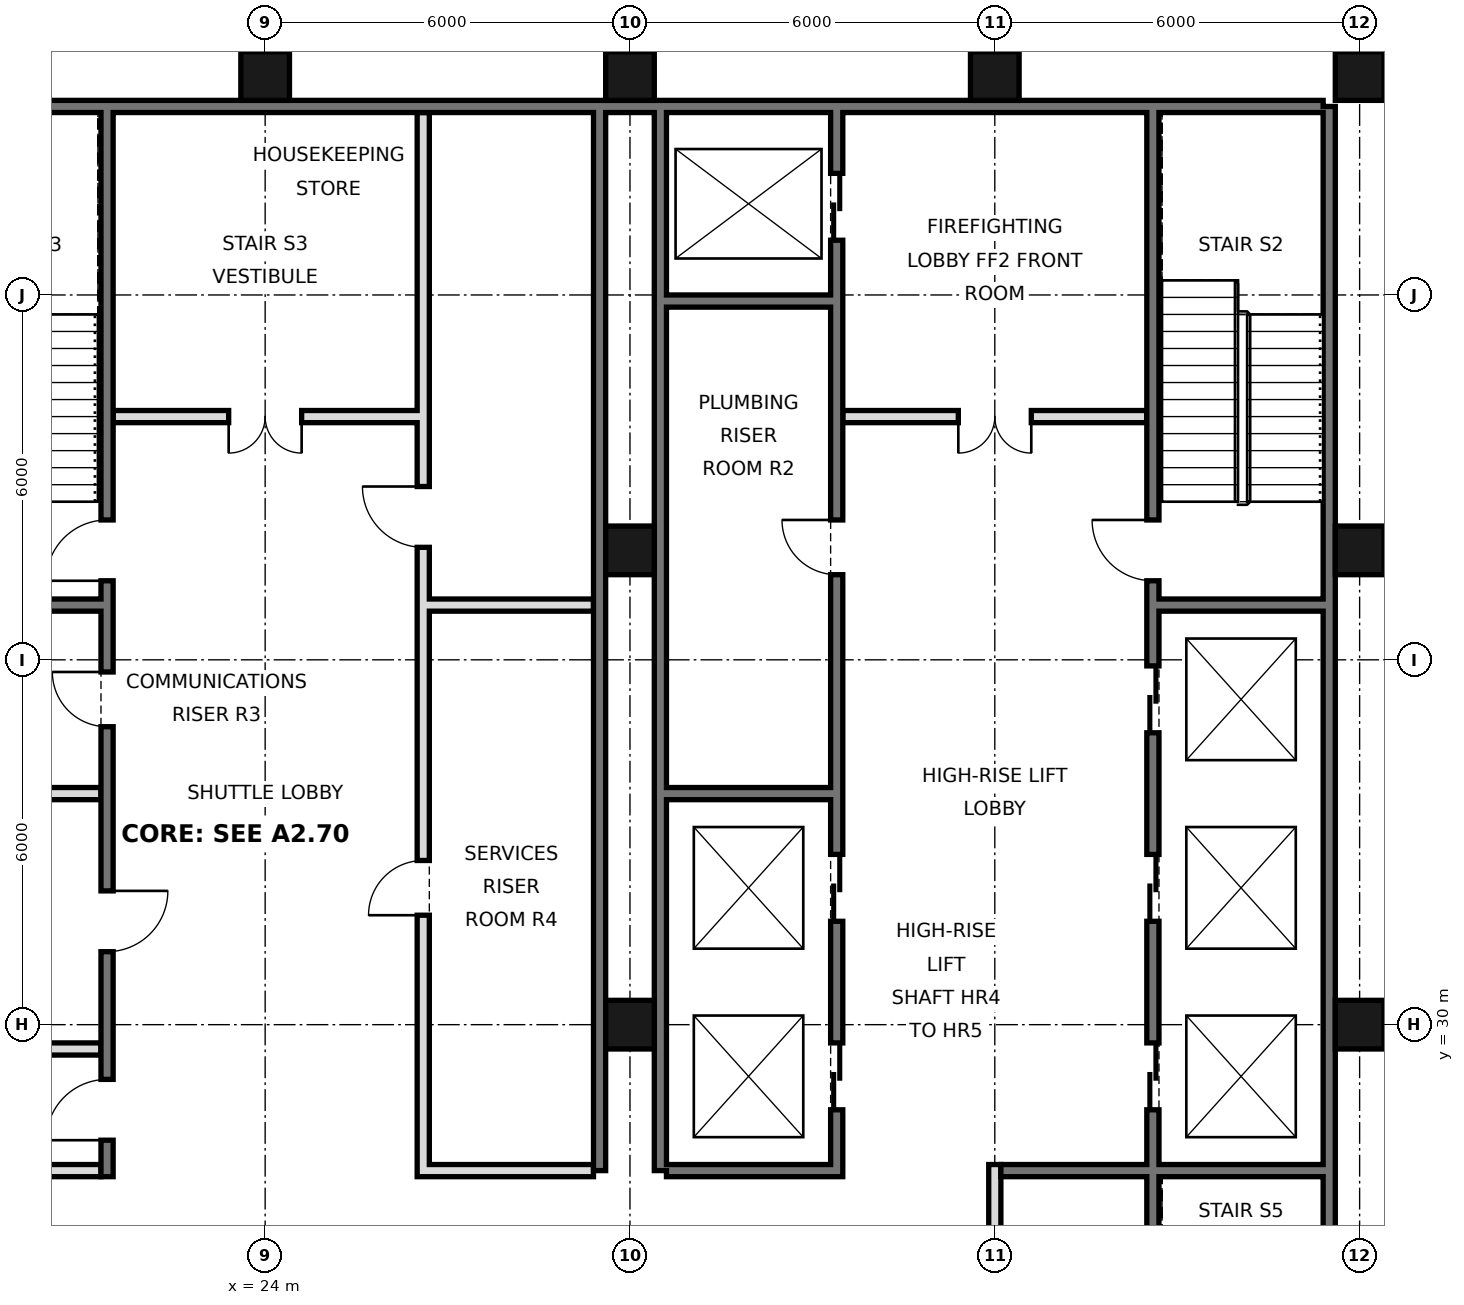
"""IFC4 building model, lengths in metres.
Left out: names, types, materials, properties, quantities, classifications, styles, units other than length and angle.
Written with IfcOpenShell. Run it as: python <this file> out.ifc"""

import sys

from ifc_helpers import new_model, si_unit, direction, frame, frame_2d, origin, origin_2d, place, context, subcontext, project, spatial, rectangle, hollow_rectangle, extrude, element, fill, save


model = new_model("IFC4")
c1 = context("Model", 3, precision=1e-05, world=origin(), true_north=direction((0.0, 1.0)))
c2 = subcontext(c1, "Body", "Model", "MODEL_VIEW")
j1 = project(units=[si_unit("LENGTHUNIT", "METRE"), si_unit("PLANEANGLEUNIT", "RADIAN")], contexts=[c1])
p1 = place(None, origin())
s1 = spatial("IfcSite", under=j1, at=p1, CompositionType="ELEMENT")
p2 = place(p1, origin())
s2 = spatial("IfcBuilding", under=s1, at=p2, CompositionType="ELEMENT")
p3 = place(p2, frame((0.0, 0.0, 277.4)))
s3 = spatial("IfcBuildingStorey", under=s2, at=p3, CompositionType="ELEMENT", Elevation=277.4)
for number, where, z_axis, x_axis in (
    (1, (24.0, 45.6, 0.0), (0.0, 0.0, 1.0), (1.0, 0.0, 0.0)),
    (2, (30.0, 30.0, 0.0), (0.0, 0.0, 1.0), (1.0, 0.0, 0.0)),
    (3, (30.0, 37.8, 0.0), (0.0, 0.0, 1.0), (1.0, 0.0, 0.0)),
    (4, (30.0, 45.6, 0.0), (0.0, 0.0, 1.0), (1.0, 0.0, 0.0)),
    (5, (36.0, 45.6, 0.0), (0.0, 0.0, 1.0), (1.0, 0.0, 0.0)),
    (6, (42.0, 30.0, 0.0), (0.0, 0.0, 1.0), (1.0, 0.0, 0.0)),
    (7, (42.0, 37.8, 0.0), (0.0, 0.0, 1.0), (1.0, 0.0, 0.0)),
    (8, (42.0, 45.6, 0.0), (0.0, 0.0, 1.0), (1.0, 0.0, 0.0)),
):
    element("IfcColumn", number, at=place(p3, frame(where, z_axis=z_axis, x_axis=x_axis)), inside=s3, PredefinedType="COLUMN", context=c2, shape_type="SweptSolid", body=[
        extrude(hollow_rectangle(XDim=0.8, YDim=0.8, WallThickness=0.032, at=origin_2d()), origin(), (0.0, 0.0, 1.0), 4.4),
    ])
p4 = place(p3, frame((41.5, 21.6, 0.0), z_axis=(0.0, 0.0, 1.0), x_axis=(0.0, 1.0, 0.0)))
e9 = element("IfcWall", 9, at=p4, inside=s3, PredefinedType="SOLIDWALL", context=c2, shape_type="SweptSolid", body=[
    extrude(rectangle(XDim=23.5, YDim=0.2, at=frame_2d((11.75, 0.0))), origin(), (0.0, 0.0, 1.0), 4.1),
])
p5 = place(p3, frame((6.6, 45.1, 0.0), z_axis=(0.0, 0.0, 1.0), x_axis=(1.0, 0.0, 0.0)))
e10 = element("IfcWall", 10, at=p5, inside=s3, PredefinedType="SOLIDWALL", context=c2, shape_type="SweptSolid", body=[
    extrude(rectangle(XDim=34.8, YDim=0.2, at=frame_2d((17.4, 0.0))), origin(), (0.0, 0.0, 1.0), 4.1),
])
for number, where, z_axis, x_axis in (
    (11, (29.5, 27.6, 0.0), (0.0, 0.0, 1.0), (0.0, 1.0, 0.0)),
    (12, (30.5, 27.6, 0.0), (0.0, 0.0, 1.0), (0.0, 1.0, 0.0)),
):
    element("IfcWall", number, at=place(p3, frame(where, z_axis=z_axis, x_axis=x_axis)), inside=s3, PredefinedType="SOLIDWALL", context=c2, shape_type="SweptSolid", body=[
        extrude(rectangle(XDim=17.5, YDim=0.2, at=frame_2d((8.75, 0.0))), origin(), (0.0, 0.0, 1.0), 4.1),
    ])
p6 = place(p3, frame((21.4, 27.5, 0.0), z_axis=(0.0, 0.0, 1.0), x_axis=(0.0, 1.0, 0.0)))
e13 = element("IfcWall", 13, at=p6, inside=s3, PredefinedType="SOLIDWALL", context=c2, shape_type="SweptSolid", body=[
    extrude(rectangle(XDim=17.5, YDim=0.2, at=frame_2d((8.75, 0.0))), origin(), (0.0, 0.0, 1.0), 4.1),
])
p7 = place(p6, frame((0.6, 0.0, 0.0)))
e14 = element("IfcOpeningElement", 14, at=p7, cuts=e13, PredefinedType="OPENING", context=c2, shape_type="SweptSolid", body=[
    extrude(rectangle(XDim=1.0, YDim=2.1, at=frame_2d((0.5, 1.05))), frame((0.0, 0.11, 0.0), z_axis=(0.0, -1.0, 0.0), x_axis=(1.0, 0.0, 0.0)), (0.0, 0.0, 1.0), 0.22),
])
p8 = place(p6, frame((3.7, 0.0, 0.0)))
e15 = element("IfcOpeningElement", 15, at=p8, cuts=e13, PredefinedType="OPENING", context=c2, shape_type="SweptSolid", body=[
    extrude(rectangle(XDim=1.0, YDim=2.1, at=frame_2d((0.5, 1.05))), frame((0.0, 0.11, 0.0), z_axis=(0.0, -1.0, 0.0), x_axis=(1.0, 0.0, 0.0)), (0.0, 0.0, 1.0), 0.22),
])
p9 = place(p6, frame((9.8, 0.0, 0.0)))
e16 = element("IfcOpeningElement", 16, at=p9, cuts=e13, PredefinedType="OPENING", context=c2, shape_type="SweptSolid", body=[
    extrude(rectangle(XDim=1.0, YDim=2.1, at=frame_2d((0.5, 1.05))), frame((0.0, 0.11, 0.0), z_axis=(0.0, -1.0, 0.0), x_axis=(1.0, 0.0, 0.0)), (0.0, 0.0, 1.0), 0.22),
])
p10 = place(p6, frame((7.4, 0.0, 0.0)))
e17 = element("IfcOpeningElement", 17, at=p10, cuts=e13, PredefinedType="OPENING", context=c2, shape_type="SweptSolid", body=[
    extrude(rectangle(XDim=0.9, YDim=2.1, at=frame_2d((0.45, 1.05))), frame((0.0, 0.11, 0.0), z_axis=(0.0, -1.0, 0.0), x_axis=(1.0, 0.0, 0.0)), (0.0, 0.0, 1.0), 0.22),
])
p11 = place(p3, frame((26.6, 27.5, 0.0), z_axis=(0.0, 0.0, 1.0), x_axis=(0.0, 1.0, 0.0)))
e18 = element("IfcWall", 18, at=p11, inside=s3, PredefinedType="SOLIDWALL", context=c2, shape_type="SweptSolid", body=[
    extrude(rectangle(XDim=17.5, YDim=0.2, at=frame_2d((8.75, 0.0))), origin(), (0.0, 0.0, 1.0), 4.1),
])
p12 = place(p11, frame((4.3, 0.0, 0.0)))
e19 = element("IfcOpeningElement", 19, at=p12, cuts=e18, PredefinedType="OPENING", context=c2, shape_type="SweptSolid", body=[
    extrude(rectangle(XDim=0.9, YDim=2.1, at=frame_2d((0.45, 1.05))), frame((0.0, 0.11, 0.0), z_axis=(0.0, -1.0, 0.0), x_axis=(1.0, 0.0, 0.0)), (0.0, 0.0, 1.0), 0.22),
])
p13 = place(p11, frame((10.35, 0.0, 0.0)))
e20 = element("IfcOpeningElement", 20, at=p13, cuts=e18, PredefinedType="OPENING", context=c2, shape_type="SweptSolid", body=[
    extrude(rectangle(XDim=1.0, YDim=2.1, at=frame_2d((0.5, 1.05))), frame((0.0, 0.11, 0.0), z_axis=(0.0, -1.0, 0.0), x_axis=(1.0, 0.0, 0.0)), (0.0, 0.0, 1.0), 0.22),
])
p14 = place(p3, frame((33.4, 27.5, 0.0), z_axis=(0.0, 0.0, 1.0), x_axis=(0.0, 1.0, 0.0)))
e21 = element("IfcWall", 21, at=p14, inside=s3, PredefinedType="SOLIDWALL", context=c2, shape_type="SweptSolid", body=[
    extrude(rectangle(XDim=17.5, YDim=0.2, at=frame_2d((8.75, 0.0))), origin(), (0.0, 0.0, 1.0), 4.1),
])
p15 = place(p14, frame((1.1, 0.0, 0.0)))
e22 = element("IfcOpeningElement", 22, at=p15, cuts=e21, PredefinedType="OPENING", context=c2, shape_type="SweptSolid", body=[
    extrude(rectangle(XDim=1.1, YDim=2.1, at=frame_2d((0.55, 1.05))), frame((0.0, 0.11, 0.0), z_axis=(0.0, -1.0, 0.0), x_axis=(1.0, 0.0, 0.0)), (0.0, 0.0, 1.0), 0.22),
])
p16 = place(p14, frame((4.2, 0.0, 0.0)))
e23 = element("IfcOpeningElement", 23, at=p16, cuts=e21, PredefinedType="OPENING", context=c2, shape_type="SweptSolid", body=[
    extrude(rectangle(XDim=1.1, YDim=2.1, at=frame_2d((0.55, 1.05))), frame((0.0, 0.11, 0.0), z_axis=(0.0, -1.0, 0.0), x_axis=(1.0, 0.0, 0.0)), (0.0, 0.0, 1.0), 0.22),
])
p17 = place(p14, frame((15.4, 0.0, 0.0)))
e24 = element("IfcOpeningElement", 24, at=p17, cuts=e21, PredefinedType="OPENING", context=c2, shape_type="SweptSolid", body=[
    extrude(rectangle(XDim=1.1, YDim=2.1, at=frame_2d((0.55, 1.05))), frame((0.0, 0.11, 0.0), z_axis=(0.0, -1.0, 0.0), x_axis=(1.0, 0.0, 0.0)), (0.0, 0.0, 1.0), 0.22),
])
p18 = place(p14, frame((9.9, 0.0, 0.0)))
e25 = element("IfcOpeningElement", 25, at=p18, cuts=e21, PredefinedType="OPENING", context=c2, shape_type="SweptSolid", body=[
    extrude(rectangle(XDim=0.9, YDim=2.1, at=frame_2d((0.45, 1.05))), frame((0.0, 0.11, 0.0), z_axis=(0.0, -1.0, 0.0), x_axis=(1.0, 0.0, 0.0)), (0.0, 0.0, 1.0), 0.22),
])
p19 = place(p3, frame((36.0, 21.6, 0.0), z_axis=(0.0, 0.0, 1.0), x_axis=(0.0, 1.0, 0.0)))
e26 = element("IfcWall", 26, at=p19, inside=s3, PredefinedType="PARTITIONING", context=c2, shape_type="SweptSolid", body=[
    extrude(rectangle(XDim=6.1, YDim=0.2, at=frame_2d((3.05, 0.0))), origin(), (0.0, 0.0, 1.0), 4.1),
])
p20 = place(p3, frame((38.6, 21.6, 0.0), z_axis=(0.0, 0.0, 1.0), x_axis=(0.0, 1.0, 0.0)))
e27 = element("IfcWall", 27, at=p20, inside=s3, PredefinedType="SOLIDWALL", context=c2, shape_type="SweptSolid", body=[
    extrude(rectangle(XDim=23.4, YDim=0.2, at=frame_2d((11.7, 0.0))), origin(), (0.0, 0.0, 1.0), 4.1),
])
p21 = place(p20, frame((7.0, 0.0, 0.0)))
e28 = element("IfcOpeningElement", 28, at=p21, cuts=e27, PredefinedType="OPENING", context=c2, shape_type="SweptSolid", body=[
    extrude(rectangle(XDim=1.1, YDim=2.1, at=frame_2d((0.55, 1.05))), frame((0.0, 0.11, 0.0), z_axis=(0.0, -1.0, 0.0), x_axis=(1.0, 0.0, 0.0)), (0.0, 0.0, 1.0), 0.22),
])
p22 = place(p20, frame((10.1, 0.0, 0.0)))
e29 = element("IfcOpeningElement", 29, at=p22, cuts=e27, PredefinedType="OPENING", context=c2, shape_type="SweptSolid", body=[
    extrude(rectangle(XDim=1.1, YDim=2.1, at=frame_2d((0.55, 1.05))), frame((0.0, 0.11, 0.0), z_axis=(0.0, -1.0, 0.0), x_axis=(1.0, 0.0, 0.0)), (0.0, 0.0, 1.0), 0.22),
])
p23 = place(p20, frame((13.2, 0.0, 0.0)))
e30 = element("IfcOpeningElement", 30, at=p23, cuts=e27, PredefinedType="OPENING", context=c2, shape_type="SweptSolid", body=[
    extrude(rectangle(XDim=1.1, YDim=2.1, at=frame_2d((0.55, 1.05))), frame((0.0, 0.11, 0.0), z_axis=(0.0, -1.0, 0.0), x_axis=(1.0, 0.0, 0.0)), (0.0, 0.0, 1.0), 0.22),
])
p24 = place(p20, frame((15.7, 0.0, 0.0)))
e31 = element("IfcOpeningElement", 31, at=p24, cuts=e27, PredefinedType="OPENING", context=c2, shape_type="SweptSolid", body=[
    extrude(rectangle(XDim=1.0, YDim=2.1, at=frame_2d((0.5, 1.05))), frame((0.0, 0.11, 0.0), z_axis=(0.0, -1.0, 0.0), x_axis=(1.0, 0.0, 0.0)), (0.0, 0.0, 1.0), 0.22),
])
p25 = place(p20, frame((0.175, 0.0, 0.0)))
e32 = element("IfcOpeningElement", 32, at=p25, cuts=e27, PredefinedType="OPENING", context=c2, shape_type="SweptSolid", body=[
    extrude(rectangle(XDim=0.9, YDim=2.1, at=frame_2d((0.45, 1.05))), frame((0.0, 0.11, 0.0), z_axis=(0.0, -1.0, 0.0), x_axis=(1.0, 0.0, 0.0)), (0.0, 0.0, 1.0), 0.22),
])
p26 = place(p3, frame((18.6, 27.6, 0.0), z_axis=(0.0, 0.0, 1.0), x_axis=(1.0, 0.0, 0.0)))
e33 = element("IfcWall", 33, at=p26, inside=s3, PredefinedType="PARTITIONING", context=c2, shape_type="SweptSolid", body=[
    extrude(rectangle(XDim=2.7, YDim=0.2, at=frame_2d((1.35, 0.0))), origin(), (0.0, 0.0, 1.0), 4.1),
])
for number, where, z_axis, x_axis in (
    (34, (26.7, 27.6, 0.0), (0.0, 0.0, 1.0), (1.0, 0.0, 0.0)),
    (35, (30.6, 27.6, 0.0), (0.0, 0.0, 1.0), (1.0, 0.0, 0.0)),
):
    element("IfcWall", number, at=place(p3, frame(where, z_axis=z_axis, x_axis=x_axis)), inside=s3, PredefinedType="SOLIDWALL", context=c2, shape_type="SweptSolid", body=[
        extrude(rectangle(XDim=2.7, YDim=0.2, at=frame_2d((1.35, 0.0))), origin(), (0.0, 0.0, 1.0), 4.1),
    ])
p27 = place(p3, frame((36.1, 27.6, 0.0), z_axis=(0.0, 0.0, 1.0), x_axis=(1.0, 0.0, 0.0)))
e36 = element("IfcWall", 36, at=p27, inside=s3, PredefinedType="SOLIDWALL", context=c2, shape_type="SweptSolid", body=[
    extrude(rectangle(XDim=5.3, YDim=0.2, at=frame_2d((2.65, 0.0))), origin(), (0.0, 0.0, 1.0), 4.1),
])
p28 = place(p3, frame((18.6, 29.6, 0.0), z_axis=(0.0, 0.0, 1.0), x_axis=(1.0, 0.0, 0.0)))
e37 = element("IfcWall", 37, at=p28, inside=s3, PredefinedType="PARTITIONING", context=c2, shape_type="SweptSolid", body=[
    extrude(rectangle(XDim=2.7, YDim=0.2, at=frame_2d((1.35, 0.0))), origin(), (0.0, 0.0, 1.0), 4.1),
])
for number, where, z_axis, x_axis in (
    (38, (18.6, 33.8, 0.0), (0.0, 0.0, 1.0), (1.0, 0.0, 0.0)),
    (39, (30.6, 33.8, 0.0), (0.0, 0.0, 1.0), (1.0, 0.0, 0.0)),
    (40, (18.6, 36.9, 0.0), (0.0, 0.0, 1.0), (1.0, 0.0, 0.0)),
    (41, (26.7, 36.9, 0.0), (0.0, 0.0, 1.0), (1.0, 0.0, 0.0)),
    (42, (38.7, 36.9, 0.0), (0.0, 0.0, 1.0), (1.0, 0.0, 0.0)),
):
    element("IfcWall", number, at=place(p3, frame(where, z_axis=z_axis, x_axis=x_axis)), inside=s3, PredefinedType="SOLIDWALL", context=c2, shape_type="SweptSolid", body=[
        extrude(rectangle(XDim=2.7, YDim=0.2, at=frame_2d((1.35, 0.0))), origin(), (0.0, 0.0, 1.0), 4.1),
    ])
p29 = place(p3, frame((21.5, 40.0, 0.0), z_axis=(0.0, 0.0, 1.0), x_axis=(1.0, 0.0, 0.0)))
e43 = element("IfcWall", 43, at=p29, inside=s3, PredefinedType="PARTITIONING", context=c2, shape_type="SweptSolid", body=[
    extrude(rectangle(XDim=5.0, YDim=0.2, at=frame_2d((2.5, 0.0))), origin(), (0.0, 0.0, 1.0), 4.1),
])
p30 = place(p29, frame((1.9, 0.0, 0.0)))
e44 = element("IfcOpeningElement", 44, at=p30, cuts=e43, PredefinedType="OPENING", context=c2, shape_type="SweptSolid", body=[
    extrude(rectangle(XDim=1.2, YDim=2.1, at=frame_2d((0.6, 1.05))), frame((0.0, 0.11, 0.0), z_axis=(0.0, -1.0, 0.0), x_axis=(1.0, 0.0, 0.0)), (0.0, 0.0, 1.0), 0.22),
])
p31 = place(p3, frame((33.5, 40.0, 0.0), z_axis=(0.0, 0.0, 1.0), x_axis=(1.0, 0.0, 0.0)))
e45 = element("IfcWall", 45, at=p31, inside=s3, PredefinedType="PARTITIONING", context=c2, shape_type="SweptSolid", body=[
    extrude(rectangle(XDim=5.0, YDim=0.2, at=frame_2d((2.5, 0.0))), origin(), (0.0, 0.0, 1.0), 4.1),
])
p32 = place(p31, frame((1.9, 0.0, 0.0)))
e46 = element("IfcOpeningElement", 46, at=p32, cuts=e45, PredefinedType="OPENING", context=c2, shape_type="SweptSolid", body=[
    extrude(rectangle(XDim=1.2, YDim=2.1, at=frame_2d((0.6, 1.05))), frame((0.0, 0.11, 0.0), z_axis=(0.0, -1.0, 0.0), x_axis=(1.0, 0.0, 0.0)), (0.0, 0.0, 1.0), 0.22),
])
p33 = place(p3, frame((30.6, 41.9, 0.0), z_axis=(0.0, 0.0, 1.0), x_axis=(1.0, 0.0, 0.0)))
e47 = element("IfcWall", 47, at=p33, inside=s3, PredefinedType="SOLIDWALL", context=c2, shape_type="SweptSolid", body=[
    extrude(rectangle(XDim=2.7, YDim=0.2, at=frame_2d((1.35, 0.0))), origin(), (0.0, 0.0, 1.0), 4.1),
])
p34 = place(p30, frame((1.2, 0.0, 0.0), z_axis=(0.0, 0.0, 1.0), x_axis=(-1.0, 0.0, 0.0)))
e48 = element("IfcDoor", 48, at=p34, inside=s3, OperationType="DOUBLE_DOOR_SINGLE_SWING", PredefinedType="DOOR", context=c2, shape_type="SweptSolid", body=[
    extrude(rectangle(XDim=1.2, YDim=2.1, at=frame_2d((0.6, 1.05))), frame((0.0, 0.025, 0.0), z_axis=(0.0, -1.0, 0.0), x_axis=(1.0, 0.0, 0.0)), (0.0, 0.0, 1.0), 0.05),
])
fill(e44, e48)
p35 = place(p32, frame((1.2, 0.0, 0.0), z_axis=(0.0, 0.0, 1.0), x_axis=(-1.0, 0.0, 0.0)))
e49 = element("IfcDoor", 49, at=p35, inside=s3, OperationType="DOUBLE_DOOR_SINGLE_SWING", PredefinedType="DOOR", context=c2, shape_type="SweptSolid", body=[
    extrude(rectangle(XDim=1.2, YDim=2.1, at=frame_2d((0.6, 1.05))), frame((0.0, 0.025, 0.0), z_axis=(0.0, -1.0, 0.0), x_axis=(1.0, 0.0, 0.0)), (0.0, 0.0, 1.0), 0.05),
])
fill(e46, e49)
p36 = place(p21, origin())
e50 = element("IfcDoor", 50, at=p36, inside=s3, OperationType="DOUBLE_DOOR_SLIDING", PredefinedType="DOOR", context=c2, shape_type="SweptSolid", body=[
    extrude(rectangle(XDim=1.1, YDim=2.1, at=frame_2d((0.55, 1.05))), frame((0.0, 0.025, 0.0), z_axis=(0.0, -1.0, 0.0), x_axis=(1.0, 0.0, 0.0)), (0.0, 0.0, 1.0), 0.05),
])
fill(e28, e50)
p37 = place(p22, origin())
e51 = element("IfcDoor", 51, at=p37, inside=s3, OperationType="DOUBLE_DOOR_SLIDING", PredefinedType="DOOR", context=c2, shape_type="SweptSolid", body=[
    extrude(rectangle(XDim=1.1, YDim=2.1, at=frame_2d((0.55, 1.05))), frame((0.0, 0.025, 0.0), z_axis=(0.0, -1.0, 0.0), x_axis=(1.0, 0.0, 0.0)), (0.0, 0.0, 1.0), 0.05),
])
fill(e29, e51)
p38 = place(p23, origin())
e52 = element("IfcDoor", 52, at=p38, inside=s3, OperationType="DOUBLE_DOOR_SLIDING", PredefinedType="DOOR", context=c2, shape_type="SweptSolid", body=[
    extrude(rectangle(XDim=1.1, YDim=2.1, at=frame_2d((0.55, 1.05))), frame((0.0, 0.025, 0.0), z_axis=(0.0, -1.0, 0.0), x_axis=(1.0, 0.0, 0.0)), (0.0, 0.0, 1.0), 0.05),
])
fill(e30, e52)
p39 = place(p15, origin())
e53 = element("IfcDoor", 53, at=p39, inside=s3, OperationType="DOUBLE_DOOR_SLIDING", PredefinedType="DOOR", context=c2, shape_type="SweptSolid", body=[
    extrude(rectangle(XDim=1.1, YDim=2.1, at=frame_2d((0.55, 1.05))), frame((0.0, 0.025, 0.0), z_axis=(0.0, -1.0, 0.0), x_axis=(1.0, 0.0, 0.0)), (0.0, 0.0, 1.0), 0.05),
])
fill(e22, e53)
p40 = place(p16, origin())
e54 = element("IfcDoor", 54, at=p40, inside=s3, OperationType="DOUBLE_DOOR_SLIDING", PredefinedType="DOOR", context=c2, shape_type="SweptSolid", body=[
    extrude(rectangle(XDim=1.1, YDim=2.1, at=frame_2d((0.55, 1.05))), frame((0.0, 0.025, 0.0), z_axis=(0.0, -1.0, 0.0), x_axis=(1.0, 0.0, 0.0)), (0.0, 0.0, 1.0), 0.05),
])
fill(e23, e54)
p41 = place(p17, origin())
e55 = element("IfcDoor", 55, at=p41, inside=s3, OperationType="DOUBLE_DOOR_SLIDING", PredefinedType="DOOR", context=c2, shape_type="SweptSolid", body=[
    extrude(rectangle(XDim=1.1, YDim=2.1, at=frame_2d((0.55, 1.05))), frame((0.0, 0.025, 0.0), z_axis=(0.0, -1.0, 0.0), x_axis=(1.0, 0.0, 0.0)), (0.0, 0.0, 1.0), 0.05),
])
fill(e24, e55)
p42 = place(p7, origin())
e56 = element("IfcDoor", 56, at=p42, inside=s3, OperationType="SINGLE_SWING_LEFT", PredefinedType="DOOR", context=c2, shape_type="SweptSolid", body=[
    extrude(rectangle(XDim=1.0, YDim=2.1, at=frame_2d((0.5, 1.05))), frame((0.0, 0.025, 0.0), z_axis=(0.0, -1.0, 0.0), x_axis=(1.0, 0.0, 0.0)), (0.0, 0.0, 1.0), 0.05),
])
fill(e14, e56)
p43 = place(p8, origin())
e57 = element("IfcDoor", 57, at=p43, inside=s3, OperationType="SINGLE_SWING_RIGHT", PredefinedType="DOOR", context=c2, shape_type="SweptSolid", body=[
    extrude(rectangle(XDim=1.0, YDim=2.1, at=frame_2d((0.5, 1.05))), frame((0.0, 0.025, 0.0), z_axis=(0.0, -1.0, 0.0), x_axis=(1.0, 0.0, 0.0)), (0.0, 0.0, 1.0), 0.05),
])
fill(e15, e57)
p44 = place(p24, frame((1.0, 0.0, 0.0), z_axis=(0.0, 0.0, 1.0), x_axis=(-1.0, 0.0, 0.0)))
e58 = element("IfcDoor", 58, at=p44, inside=s3, OperationType="SINGLE_SWING_LEFT", PredefinedType="DOOR", context=c2, shape_type="SweptSolid", body=[
    extrude(rectangle(XDim=1.0, YDim=2.1, at=frame_2d((0.5, 1.05))), frame((0.0, 0.025, 0.0), z_axis=(0.0, -1.0, 0.0), x_axis=(1.0, 0.0, 0.0)), (0.0, 0.0, 1.0), 0.05),
])
fill(e31, e58)
p45 = place(p9, origin())
e59 = element("IfcDoor", 59, at=p45, inside=s3, OperationType="SINGLE_SWING_LEFT", PredefinedType="DOOR", context=c2, shape_type="SweptSolid", body=[
    extrude(rectangle(XDim=1.0, YDim=2.1, at=frame_2d((0.5, 1.05))), frame((0.0, 0.025, 0.0), z_axis=(0.0, -1.0, 0.0), x_axis=(1.0, 0.0, 0.0)), (0.0, 0.0, 1.0), 0.05),
])
fill(e16, e59)
p46 = place(p18, frame((0.9, 0.0, 0.0), z_axis=(0.0, 0.0, 1.0), x_axis=(-1.0, 0.0, 0.0)))
e60 = element("IfcDoor", 60, at=p46, inside=s3, OperationType="SINGLE_SWING_LEFT", PredefinedType="DOOR", context=c2, shape_type="SweptSolid", body=[
    extrude(rectangle(XDim=0.9, YDim=2.1, at=frame_2d((0.45, 1.05))), frame((0.0, 0.025, 0.0), z_axis=(0.0, -1.0, 0.0), x_axis=(1.0, 0.0, 0.0)), (0.0, 0.0, 1.0), 0.05),
])
fill(e25, e60)
p47 = place(p10, frame((0.9, 0.0, 0.0), z_axis=(0.0, 0.0, 1.0), x_axis=(-1.0, 0.0, 0.0)))
e61 = element("IfcDoor", 61, at=p47, inside=s3, OperationType="SINGLE_SWING_LEFT", PredefinedType="DOOR", context=c2, shape_type="SweptSolid", body=[
    extrude(rectangle(XDim=0.9, YDim=2.1, at=frame_2d((0.45, 1.05))), frame((0.0, 0.025, 0.0), z_axis=(0.0, -1.0, 0.0), x_axis=(1.0, 0.0, 0.0)), (0.0, 0.0, 1.0), 0.05),
])
fill(e17, e61)
p48 = place(p12, origin())
e62 = element("IfcDoor", 62, at=p48, inside=s3, OperationType="SINGLE_SWING_LEFT", PredefinedType="DOOR", context=c2, shape_type="SweptSolid", body=[
    extrude(rectangle(XDim=0.9, YDim=2.1, at=frame_2d((0.45, 1.05))), frame((0.0, 0.025, 0.0), z_axis=(0.0, -1.0, 0.0), x_axis=(1.0, 0.0, 0.0)), (0.0, 0.0, 1.0), 0.05),
])
fill(e19, e62)
p49 = place(p13, frame((1.0, 0.0, 0.0), z_axis=(0.0, 0.0, 1.0), x_axis=(-1.0, 0.0, 0.0)))
e63 = element("IfcDoor", 63, at=p49, inside=s3, OperationType="SINGLE_SWING_LEFT", PredefinedType="DOOR", context=c2, shape_type="SweptSolid", body=[
    extrude(rectangle(XDim=1.0, YDim=2.1, at=frame_2d((0.5, 1.05))), frame((0.0, 0.025, 0.0), z_axis=(0.0, -1.0, 0.0), x_axis=(1.0, 0.0, 0.0)), (0.0, 0.0, 1.0), 0.05),
])
fill(e20, e63)
save(model, sys.argv[1])
